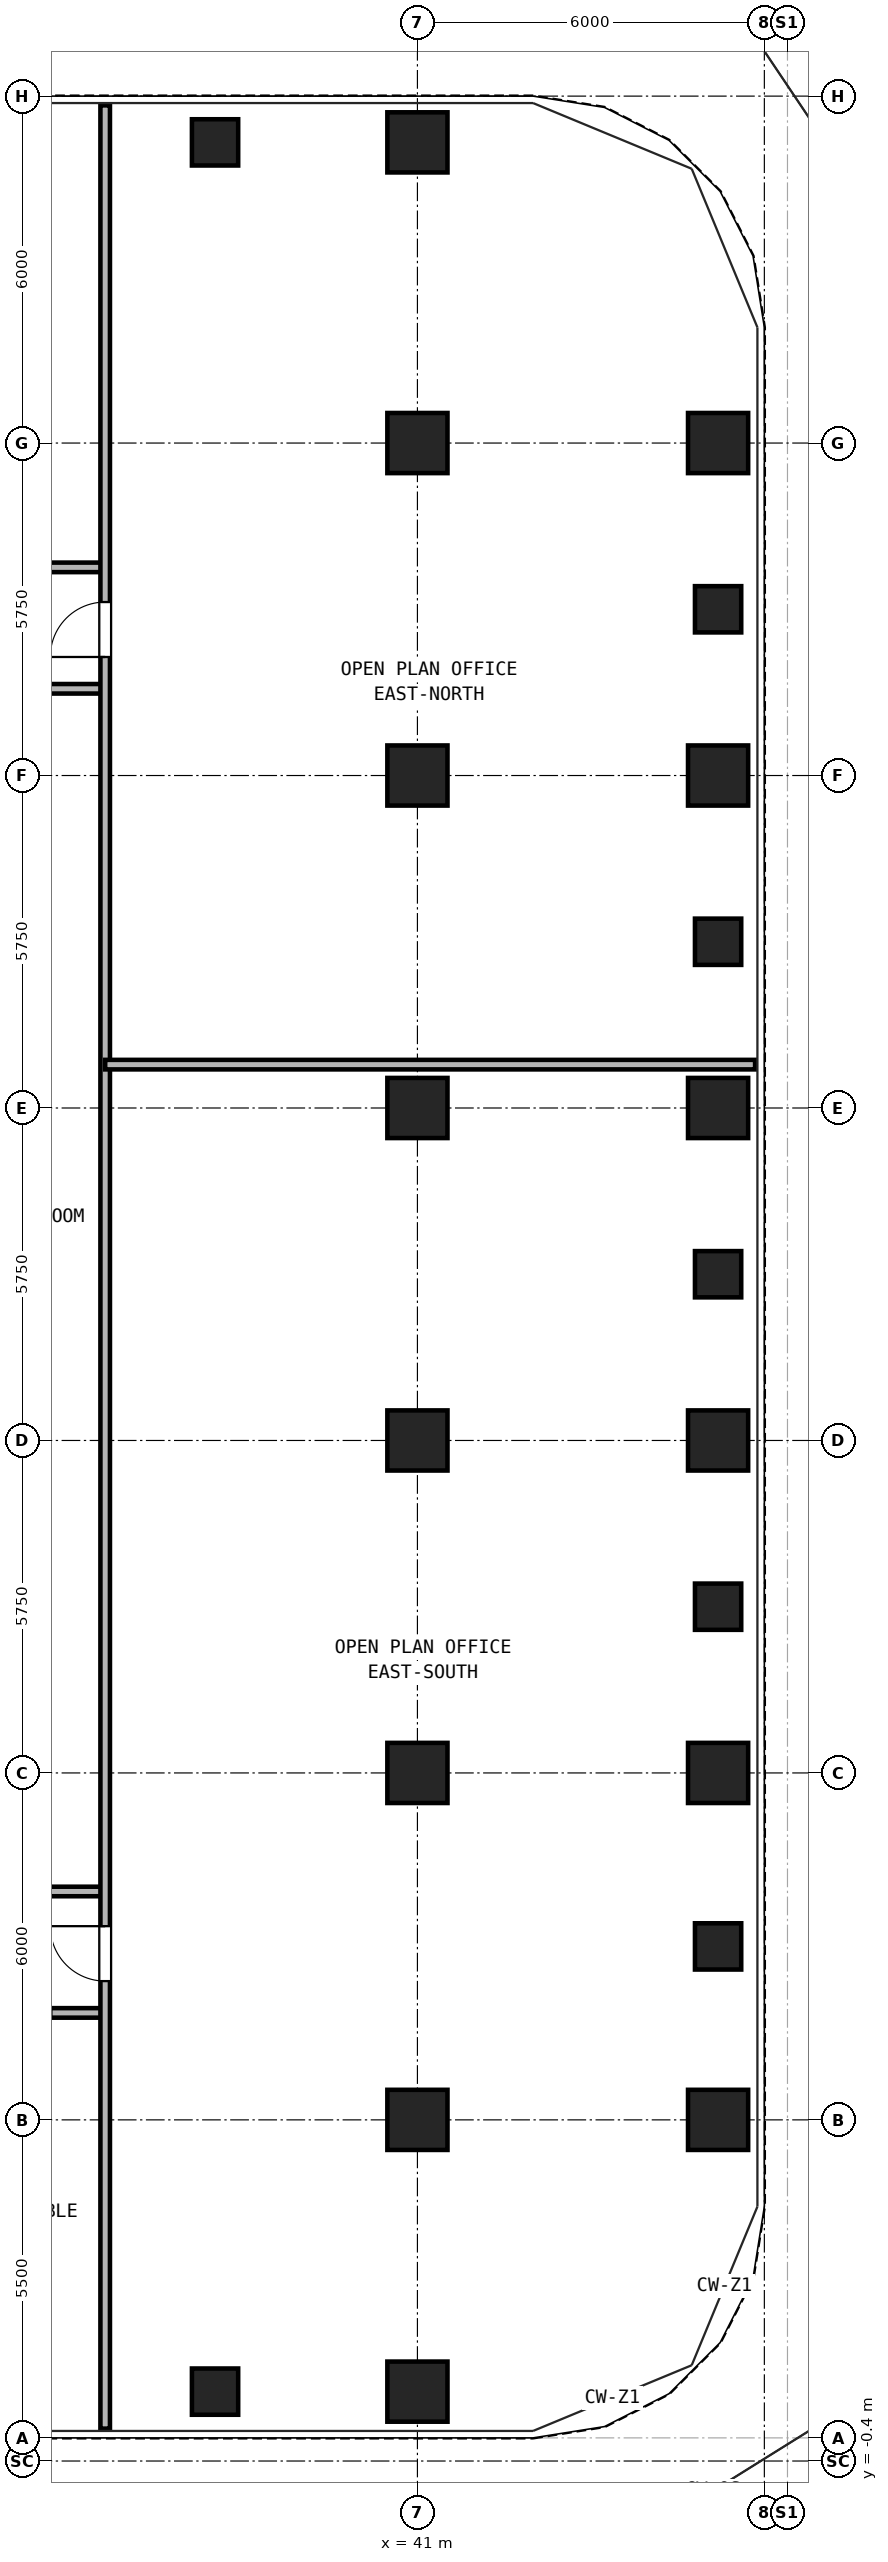
"""IFC4 building model, lengths in metres.
Left out: names, types, materials, properties, quantities, classifications, styles, units other than length and angle.
Written with IfcOpenShell. Run it as: python <this file> out.ifc"""

import sys

from ifc_helpers import new_model, si_unit, direction, frame, frame_2d, origin, origin_2d, place, context, subcontext, project, spatial, rectangle, hollow_rectangle, extrude, source, transform, mapped, element, fill, save


model = new_model("IFC4")
c1 = context("Model", 3, precision=1e-05, world=origin(), true_north=direction((0.0, 1.0)))
c2 = subcontext(c1, "Body", "Model", "MODEL_VIEW")
j1 = project(units=[si_unit("LENGTHUNIT", "METRE"), si_unit("PLANEANGLEUNIT", "RADIAN")], contexts=[c1])
p1 = place(None, origin())
s1 = spatial("IfcSite", under=j1, at=p1, CompositionType="ELEMENT")
p2 = place(p1, origin())
s2 = spatial("IfcBuilding", under=s1, at=p2, CompositionType="ELEMENT")
p3 = place(p2, frame((0.0, 0.0, 33.3)))
s3 = spatial("IfcBuildingStorey", under=s2, at=p3, CompositionType="ELEMENT", Elevation=33.3)
m1 = source(origin(), c2, "Body", "SweptSolid", [
    extrude(hollow_rectangle(XDim=1.04, YDim=1.04, WallThickness=0.065, at=origin_2d()), origin(), (0.0, 0.0, 1.0), 3.32),
])
for number, where, z_axis, x_axis in (
    (1, (41.0, 0.8, 0.0), (0.0, 0.0, 1.0), (1.0, 0.0, 0.0)),
    (2, (41.0, 39.7, 0.0), (0.0, 0.0, 1.0), (1.0, 0.0, 0.0)),
    (3, (46.2, 5.5, 0.0), (0.0, 0.0, 1.0), (1.0, 0.0, 0.0)),
    (4, (46.2, 11.5, 0.0), (0.0, 0.0, 1.0), (1.0, 0.0, 0.0)),
    (5, (46.2, 17.25, 0.0), (0.0, 0.0, 1.0), (1.0, 0.0, 0.0)),
    (6, (46.2, 23.0, 0.0), (0.0, 0.0, 1.0), (1.0, 0.0, 0.0)),
    (7, (46.2, 28.75, 0.0), (0.0, 0.0, 1.0), (1.0, 0.0, 0.0)),
    (8, (46.2, 34.5, 0.0), (0.0, 0.0, 1.0), (1.0, 0.0, 0.0)),
    (9, (41.0, 5.5, 0.0), (0.0, 0.0, 1.0), (1.0, 0.0, 0.0)),
    (10, (41.0, 11.5, 0.0), (0.0, 0.0, 1.0), (1.0, 0.0, 0.0)),
    (11, (41.0, 17.25, 0.0), (0.0, 0.0, 1.0), (1.0, 0.0, 0.0)),
    (12, (41.0, 23.0, 0.0), (0.0, 0.0, 1.0), (1.0, 0.0, 0.0)),
    (13, (41.0, 28.75, 0.0), (0.0, 0.0, 1.0), (1.0, 0.0, 0.0)),
    (14, (41.0, 34.5, 0.0), (0.0, 0.0, 1.0), (1.0, 0.0, 0.0)),
):
    element("IfcColumn", number, at=place(p3, frame(where, z_axis=z_axis, x_axis=x_axis)), inside=s3, PredefinedType="COLUMN", context=c2, shape_type="MappedRepresentation", body=[
        mapped(m1, transform((0.0, 0.0, 0.0), x_axis=(1.0, 0.0, 0.0), y_axis=(0.0, 1.0, 0.0), z_axis=(0.0, 0.0, 1.0), scale=1.0)),
    ])
m2 = source(origin(), c2, "Body", "SweptSolid", [
    extrude(hollow_rectangle(XDim=0.8, YDim=0.8, WallThickness=0.045, at=origin_2d()), origin(), (0.0, 0.0, 1.0), 3.32),
])
for number, where, z_axis, x_axis in (
    (15, (37.5, 0.8, 0.0), (0.0, 0.0, 1.0), (1.0, 0.0, 0.0)),
    (16, (37.5, 39.7, 0.0), (0.0, 0.0, 1.0), (1.0, 0.0, 0.0)),
    (17, (46.2, 8.5, 0.0), (0.0, 0.0, 1.0), (1.0, 0.0, 0.0)),
    (18, (46.2, 14.375, 0.0), (0.0, 0.0, 1.0), (1.0, 0.0, 0.0)),
    (19, (46.2, 20.125, 0.0), (0.0, 0.0, 1.0), (1.0, 0.0, 0.0)),
    (20, (46.2, 25.875, 0.0), (0.0, 0.0, 1.0), (1.0, 0.0, 0.0)),
    (21, (46.2, 31.625, 0.0), (0.0, 0.0, 1.0), (1.0, 0.0, 0.0)),
):
    element("IfcColumn", number, at=place(p3, frame(where, z_axis=z_axis, x_axis=x_axis)), inside=s3, PredefinedType="COLUMN", context=c2, shape_type="MappedRepresentation", body=[
        mapped(m2, transform((0.0, 0.0, 0.0), x_axis=(1.0, 0.0, 0.0), y_axis=(0.0, 1.0, 0.0), z_axis=(0.0, 0.0, 1.0), scale=1.0)),
    ])
p4 = place(p3, frame((11.4, 7.35, 0.0), z_axis=(0.0, 0.0, 1.0), x_axis=(1.0, 0.0, 0.0)))
e22 = element("IfcWall", 22, at=p4, inside=s3, PredefinedType="PARTITIONING", context=c2, shape_type="SweptSolid", body=[
    extrude(rectangle(XDim=24.2, YDim=0.165, at=frame_2d((12.1, 0.0))), origin(), (0.0, 0.0, 1.0), 3.32),
])
p5 = place(p4, frame((3.05, 0.0, 0.0)))
e23 = element("IfcOpeningElement", 23, at=p5, cuts=e22, PredefinedType="OPENING", context=c2, shape_type="SweptSolid", body=[
    extrude(rectangle(XDim=0.95, YDim=2.15, at=frame_2d((0.475, 1.075))), frame((0.0, 0.093, 0.0), z_axis=(0.0, -1.0, 0.0), x_axis=(1.0, 0.0, 0.0)), (0.0, 0.0, 1.0), 0.185),
])
p6 = place(p4, frame((11.6, 0.0, 0.0)))
e24 = element("IfcOpeningElement", 24, at=p6, cuts=e22, PredefinedType="OPENING", context=c2, shape_type="SweptSolid", body=[
    extrude(rectangle(XDim=0.95, YDim=2.15, at=frame_2d((0.475, 1.075))), frame((0.0, 0.093, 0.0), z_axis=(0.0, -1.0, 0.0), x_axis=(1.0, 0.0, 0.0)), (0.0, 0.0, 1.0), 0.185),
])
p7 = place(p4, frame((18.8, 0.0, 0.0)))
e25 = element("IfcOpeningElement", 25, at=p7, cuts=e22, PredefinedType="OPENING", context=c2, shape_type="SweptSolid", body=[
    extrude(rectangle(XDim=0.92, YDim=2.1, at=frame_2d((0.46, 1.05))), frame((0.0, 0.093, 0.0), z_axis=(0.0, -1.0, 0.0), x_axis=(1.0, 0.0, 0.0)), (0.0, 0.0, 1.0), 0.185),
])
p8 = place(p4, frame((22.35, 0.0, 0.0)))
e26 = element("IfcOpeningElement", 26, at=p8, cuts=e22, PredefinedType="OPENING", context=c2, shape_type="SweptSolid", body=[
    extrude(rectangle(XDim=0.92, YDim=2.1, at=frame_2d((0.46, 1.05))), frame((0.0, 0.093, 0.0), z_axis=(0.0, -1.0, 0.0), x_axis=(1.0, 0.0, 0.0)), (0.0, 0.0, 1.0), 0.185),
])
p9 = place(p3, frame((11.4, 32.35, 0.0), z_axis=(0.0, 0.0, 1.0), x_axis=(1.0, 0.0, 0.0)))
e27 = element("IfcWall", 27, at=p9, inside=s3, PredefinedType="PARTITIONING", context=c2, shape_type="SweptSolid", body=[
    extrude(rectangle(XDim=24.2, YDim=0.165, at=frame_2d((12.1, 0.0))), origin(), (0.0, 0.0, 1.0), 3.32),
])
p10 = place(p9, frame((2.7, 0.0, 0.0)))
e28 = element("IfcOpeningElement", 28, at=p10, cuts=e27, PredefinedType="OPENING", context=c2, shape_type="SweptSolid", body=[
    extrude(rectangle(XDim=0.95, YDim=2.15, at=frame_2d((0.475, 1.075))), frame((0.0, 0.093, 0.0), z_axis=(0.0, -1.0, 0.0), x_axis=(1.0, 0.0, 0.0)), (0.0, 0.0, 1.0), 0.185),
])
p11 = place(p9, frame((9.2, 0.0, 0.0)))
e29 = element("IfcOpeningElement", 29, at=p11, cuts=e27, PredefinedType="OPENING", context=c2, shape_type="SweptSolid", body=[
    extrude(rectangle(XDim=0.95, YDim=2.15, at=frame_2d((0.475, 1.075))), frame((0.0, 0.093, 0.0), z_axis=(0.0, -1.0, 0.0), x_axis=(1.0, 0.0, 0.0)), (0.0, 0.0, 1.0), 0.185),
])
p12 = place(p9, frame((15.9, 0.0, 0.0)))
e30 = element("IfcOpeningElement", 30, at=p12, cuts=e27, PredefinedType="OPENING", context=c2, shape_type="SweptSolid", body=[
    extrude(rectangle(XDim=0.95, YDim=2.15, at=frame_2d((0.475, 1.075))), frame((0.0, 0.093, 0.0), z_axis=(0.0, -1.0, 0.0), x_axis=(1.0, 0.0, 0.0)), (0.0, 0.0, 1.0), 0.185),
])
p13 = place(p9, frame((21.5, 0.0, 0.0)))
e31 = element("IfcOpeningElement", 31, at=p13, cuts=e27, PredefinedType="OPENING", context=c2, shape_type="SweptSolid", body=[
    extrude(rectangle(XDim=0.95, YDim=2.15, at=frame_2d((0.475, 1.075))), frame((0.0, 0.093, 0.0), z_axis=(0.0, -1.0, 0.0), x_axis=(1.0, 0.0, 0.0)), (0.0, 0.0, 1.0), 0.185),
])
for number, where, z_axis, x_axis in (
    (32, (30.7, 9.45, 0.0), (0.0, 0.0, 1.0), (1.0, 0.0, 0.0)),
    (33, (30.7, 30.25, 0.0), (0.0, 0.0, 1.0), (1.0, 0.0, 0.0)),
):
    element("IfcWall", number, at=place(p3, frame(where, z_axis=z_axis, x_axis=x_axis)), inside=s3, PredefinedType="PARTITIONING", context=c2, shape_type="SweptSolid", body=[
        extrude(rectangle(XDim=4.9, YDim=0.165, at=frame_2d((2.45, 0.0))), origin(), (0.0, 0.0, 1.0), 3.32),
    ])
p14 = place(p3, frame((35.6, 0.16, 0.0), z_axis=(0.0, 0.0, 1.0), x_axis=(0.0, 1.0, 0.0)))
e34 = element("IfcWall", 34, at=p14, inside=s3, PredefinedType="PARTITIONING", context=c2, shape_type="SweptSolid", body=[
    extrude(rectangle(XDim=40.18, YDim=0.165, at=frame_2d((20.09, 0.0))), origin(), (0.0, 0.0, 1.0), 3.32),
])
p15 = place(p14, frame((7.74, 0.0, 0.0)))
e35 = element("IfcOpeningElement", 35, at=p15, cuts=e34, PredefinedType="OPENING", context=c2, shape_type="SweptSolid", body=[
    extrude(rectangle(XDim=0.95, YDim=2.15, at=frame_2d((0.475, 1.075))), frame((0.0, 0.093, 0.0), z_axis=(0.0, -1.0, 0.0), x_axis=(1.0, 0.0, 0.0)), (0.0, 0.0, 1.0), 0.185),
])
p16 = place(p14, frame((30.64, 0.0, 0.0)))
e36 = element("IfcOpeningElement", 36, at=p16, cuts=e34, PredefinedType="OPENING", context=c2, shape_type="SweptSolid", body=[
    extrude(rectangle(XDim=0.95, YDim=2.15, at=frame_2d((0.475, 1.075))), frame((0.0, 0.093, 0.0), z_axis=(0.0, -1.0, 0.0), x_axis=(1.0, 0.0, 0.0)), (0.0, 0.0, 1.0), 0.185),
])
p17 = place(p3, frame((35.6, 23.75, 0.0), z_axis=(0.0, 0.0, 1.0), x_axis=(1.0, 0.0, 0.0)))
e37 = element("IfcWall", 37, at=p17, inside=s3, PredefinedType="PARTITIONING", context=c2, shape_type="SweptSolid", body=[
    extrude(rectangle(XDim=11.24, YDim=0.165, at=frame_2d((5.62, 0.0))), origin(), (0.0, 0.0, 1.0), 3.32),
])
p18 = place(p15, origin())
e38 = element("IfcDoor", 38, at=p18, inside=s3, OperationType="SINGLE_SWING_RIGHT", PredefinedType="DOOR", context=c2, shape_type="SweptSolid", body=[
    extrude(rectangle(XDim=0.95, YDim=2.15, at=frame_2d((0.475, 1.075))), frame((0.0, 0.025, 0.0), z_axis=(0.0, -1.0, 0.0), x_axis=(1.0, 0.0, 0.0)), (0.0, 0.0, 1.0), 0.05),
])
fill(e35, e38)
p19 = place(p16, origin())
e39 = element("IfcDoor", 39, at=p19, inside=s3, OperationType="SINGLE_SWING_LEFT", PredefinedType="DOOR", context=c2, shape_type="SweptSolid", body=[
    extrude(rectangle(XDim=0.95, YDim=2.15, at=frame_2d((0.475, 1.075))), frame((0.0, 0.025, 0.0), z_axis=(0.0, -1.0, 0.0), x_axis=(1.0, 0.0, 0.0)), (0.0, 0.0, 1.0), 0.05),
])
fill(e36, e39)
save(model, sys.argv[1])
